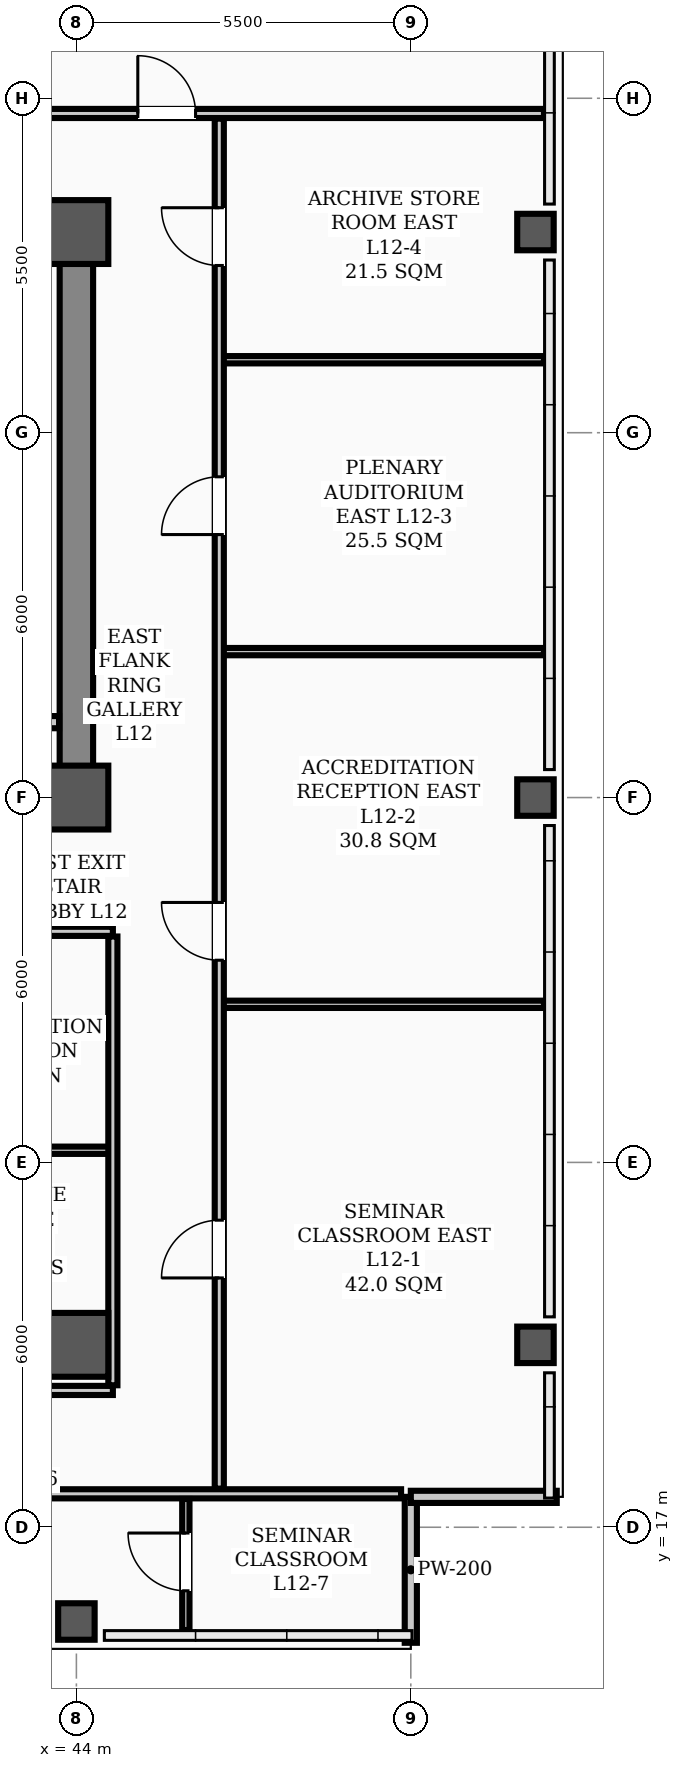
"""IFC4 building model, lengths in metres.
Left out: names, types, materials, properties, quantities, classifications, styles, units other than length and angle.
Written with IfcOpenShell. Run it as: python <this file> out.ifc"""

import sys

from ifc_helpers import new_model, si_unit, direction, frame, frame_2d, origin, origin_2d, place, context, subcontext, project, spatial, rectangle, hollow_rectangle, extrude, element, fill, save


model = new_model("IFC4")
c1 = context("Model", 3, precision=1e-05, world=origin(), true_north=direction((0.0, 1.0)))
c2 = subcontext(c1, "Body", "Model", "MODEL_VIEW")
j1 = project(units=[si_unit("LENGTHUNIT", "METRE"), si_unit("PLANEANGLEUNIT", "RADIAN")], contexts=[c1])
p1 = place(None, origin())
s1 = spatial("IfcSite", under=j1, at=p1, CompositionType="ELEMENT")
p2 = place(p1, origin())
s2 = spatial("IfcBuilding", under=s1, at=p2, CompositionType="ELEMENT")
p3 = place(p2, frame((0.0, 0.0, 49.9)))
s3 = spatial("IfcBuildingStorey", under=s2, at=p3, CompositionType="ELEMENT", Elevation=49.9)
for number, where, z_axis, x_axis in (
    (1, (44.0, 29.0, 0.0), (0.0, 0.0, 1.0), (1.0, 0.0, 0.0)),
    (2, (44.0, 38.3, 0.0), (0.0, 0.0, 1.0), (1.0, 0.0, 0.0)),
    (3, (44.0, 20.0, 0.0), (0.0, 0.0, 1.0), (1.0, 0.0, 0.0)),
):
    element("IfcColumn", number, at=place(p3, frame(where, z_axis=z_axis, x_axis=x_axis)), inside=s3, PredefinedType="COLUMN", context=c2, shape_type="SweptSolid", body=[
        extrude(hollow_rectangle(XDim=1.05, YDim=1.05, WallThickness=0.038, InnerFilletRadius=0.019, OuterFilletRadius=0.057, at=origin_2d()), origin(), (0.0, 0.0, 1.0), 3.9),
    ])
for number, where, z_axis, x_axis in (
    (4, (44.0, 15.45, 0.0), (0.0, 0.0, 1.0), (1.0, 0.0, 0.0)),
    (5, (51.55, 20.0, 0.0), (0.0, 0.0, 1.0), (1.0, 0.0, 0.0)),
    (6, (51.55, 29.0, 0.0), (0.0, 0.0, 1.0), (1.0, 0.0, 0.0)),
    (7, (51.55, 38.3, 0.0), (0.0, 0.0, 1.0), (1.0, 0.0, 0.0)),
):
    element("IfcColumn", number, at=place(p3, frame(where, z_axis=z_axis, x_axis=x_axis)), inside=s3, PredefinedType="COLUMN", context=c2, shape_type="SweptSolid", body=[
        extrude(hollow_rectangle(XDim=0.6, YDim=0.6, WallThickness=0.026, InnerFilletRadius=0.013, OuterFilletRadius=0.039, at=origin_2d()), origin(), (0.0, 0.0, 1.0), 3.9),
    ])
for number, where, z_axis, x_axis in (
    (8, (49.5, 15.1, 0.0), (0.0, 0.0, 1.0), (0.0, 1.0, 0.0)),
    (9, (49.5, 17.5, 0.0), (0.0, 0.0, 1.0), (1.0, 0.0, 0.0)),
):
    element("IfcWall", number, at=place(p3, frame(where, z_axis=z_axis, x_axis=x_axis)), inside=s3, PredefinedType="PARAPET", context=c2, shape_type="SweptSolid", body=[
        extrude(rectangle(XDim=2.4, YDim=0.2, at=frame_2d((1.2, 0.0))), origin(), (0.0, 0.0, 1.0), 1.2),
    ])
p4 = place(p3, frame((13.5, 29.0, 0.0), z_axis=(0.0, 0.0, 1.0), x_axis=(1.0, 0.0, 0.0)))
e10 = element("IfcWall", 10, at=p4, inside=s3, PredefinedType="SHEAR", context=c2, shape_type="SweptSolid", body=[
    extrude(rectangle(XDim=30.5, YDim=0.55, at=frame_2d((15.25, 0.0))), origin(), (0.0, 0.0, 1.0), 3.66),
])
p5 = place(p4, frame((1.75, 0.0, 0.0)))
e11 = element("IfcOpeningElement", 11, at=p5, cuts=e10, PredefinedType="OPENING", context=c2, shape_type="SweptSolid", body=[
    extrude(rectangle(XDim=1.1, YDim=2.08, at=frame_2d((0.55, 1.04))), frame((0.0, 0.285, 0.0), z_axis=(0.0, -1.0, 0.0), x_axis=(1.0, 0.0, 0.0)), (0.0, 0.0, 1.0), 0.57),
])
p6 = place(p4, frame((26.7, 0.0, 0.0)))
e12 = element("IfcOpeningElement", 12, at=p6, cuts=e10, PredefinedType="OPENING", context=c2, shape_type="SweptSolid", body=[
    extrude(rectangle(XDim=1.1, YDim=2.08, at=frame_2d((0.55, 1.04))), frame((0.0, 0.285, 0.0), z_axis=(0.0, -1.0, 0.0), x_axis=(1.0, 0.0, 0.0)), (0.0, 0.0, 1.0), 0.57),
])
p7 = place(p4, frame((6.8, 0.0, 0.0)))
e13 = element("IfcOpeningElement", 13, at=p7, cuts=e10, PredefinedType="OPENING", context=c2, shape_type="SweptSolid", body=[
    extrude(rectangle(XDim=1.1, YDim=2.08, at=frame_2d((0.55, 1.04))), frame((0.0, 0.285, 0.0), z_axis=(0.0, -1.0, 0.0), x_axis=(1.0, 0.0, 0.0)), (0.0, 0.0, 1.0), 0.57),
])
p8 = place(p4, frame((13.2, 0.0, 0.0)))
e14 = element("IfcOpeningElement", 14, at=p8, cuts=e10, PredefinedType="OPENING", context=c2, shape_type="SweptSolid", body=[
    extrude(rectangle(XDim=1.6, YDim=2.08, at=frame_2d((0.8, 1.04))), frame((0.0, 0.285, 0.0), z_axis=(0.0, -1.0, 0.0), x_axis=(1.0, 0.0, 0.0)), (0.0, 0.0, 1.0), 0.57),
])
p9 = place(p4, frame((19.53, 0.0, 0.0)))
e15 = element("IfcOpeningElement", 15, at=p9, cuts=e10, PredefinedType="OPENING", context=c2, shape_type="SweptSolid", body=[
    extrude(rectangle(XDim=0.9, YDim=2.08, at=frame_2d((0.45, 1.04))), frame((0.0, 0.285, 0.0), z_axis=(0.0, -1.0, 0.0), x_axis=(1.0, 0.0, 0.0)), (0.0, 0.0, 1.0), 0.57),
])
p10 = place(p4, frame((21.57, 0.0, 0.0)))
e16 = element("IfcOpeningElement", 16, at=p10, cuts=e10, PredefinedType="OPENING", context=c2, shape_type="SweptSolid", body=[
    extrude(rectangle(XDim=0.9, YDim=2.08, at=frame_2d((0.45, 1.04))), frame((0.0, 0.285, 0.0), z_axis=(0.0, -1.0, 0.0), x_axis=(1.0, 0.0, 0.0)), (0.0, 0.0, 1.0), 0.57),
])
p11 = place(p3, frame((13.5, 38.3, 0.0), z_axis=(0.0, 0.0, 1.0), x_axis=(1.0, 0.0, 0.0)))
e17 = element("IfcWall", 17, at=p11, inside=s3, PredefinedType="SHEAR", context=c2, shape_type="SweptSolid", body=[
    extrude(rectangle(XDim=30.5, YDim=0.55, at=frame_2d((15.25, 0.0))), origin(), (0.0, 0.0, 1.0), 3.66),
])
p12 = place(p3, frame((44.0, 29.35, 0.0), z_axis=(0.0, 0.0, 1.0), x_axis=(0.0, 1.0, 0.0)))
e18 = element("IfcWall", 18, at=p12, inside=s3, PredefinedType="SHEAR", context=c2, shape_type="SweptSolid", body=[
    extrude(rectangle(XDim=8.6, YDim=0.55, at=frame_2d((4.3, 0.0))), origin(), (0.0, 0.0, 1.0), 3.66),
])
p13 = place(p3, frame((42.4, 30.24, 0.0), z_axis=(0.0, 0.0, 1.0), x_axis=(1.0, 0.0, 0.0)))
e19 = element("IfcWall", 19, at=p13, inside=s3, PredefinedType="STANDARD", context=c2, shape_type="SweptSolid", body=[
    extrude(rectangle(XDim=1.315, YDim=0.2, at=frame_2d((0.658, 0.0))), origin(), (0.0, 0.0, 1.0), 2.24),
])
p14 = place(p3, frame((12.9, 26.8, 0.0), z_axis=(0.0, 0.0, 1.0), x_axis=(1.0, 0.0, 0.0)))
e20 = element("IfcWall", 20, at=p14, inside=s3, PredefinedType="PARTITIONING", context=c2, shape_type="SweptSolid", body=[
    extrude(rectangle(XDim=31.7, YDim=0.15, at=frame_2d((15.85, 0.0))), origin(), (0.0, 0.0, 1.0), 2.24),
])
p15 = place(p14, frame((13.6, 0.0, 0.0)))
e21 = element("IfcOpeningElement", 21, at=p15, cuts=e20, PredefinedType="OPENING", context=c2, shape_type="SweptSolid", body=[
    extrude(rectangle(XDim=1.6, YDim=2.08, at=frame_2d((0.8, 1.04))), frame((0.0, 0.085, 0.0), z_axis=(0.0, -1.0, 0.0), x_axis=(1.0, 0.0, 0.0)), (0.0, 0.0, 1.0), 0.17),
])
p16 = place(p14, frame((2.175, 0.0, 0.0)))
e22 = element("IfcOpeningElement", 22, at=p16, cuts=e20, PredefinedType="OPENING", context=c2, shape_type="SweptSolid", body=[
    extrude(rectangle(XDim=0.95, YDim=2.08, at=frame_2d((0.475, 1.04))), frame((0.0, 0.085, 0.0), z_axis=(0.0, -1.0, 0.0), x_axis=(1.0, 0.0, 0.0)), (0.0, 0.0, 1.0), 0.17),
])
p17 = place(p14, frame((6.925, 0.0, 0.0)))
e23 = element("IfcOpeningElement", 23, at=p17, cuts=e20, PredefinedType="OPENING", context=c2, shape_type="SweptSolid", body=[
    extrude(rectangle(XDim=0.95, YDim=2.08, at=frame_2d((0.475, 1.04))), frame((0.0, 0.085, 0.0), z_axis=(0.0, -1.0, 0.0), x_axis=(1.0, 0.0, 0.0)), (0.0, 0.0, 1.0), 0.17),
])
p18 = place(p14, frame((10.925, 0.0, 0.0)))
e24 = element("IfcOpeningElement", 24, at=p18, cuts=e20, PredefinedType="OPENING", context=c2, shape_type="SweptSolid", body=[
    extrude(rectangle(XDim=0.95, YDim=2.08, at=frame_2d((0.475, 1.04))), frame((0.0, 0.085, 0.0), z_axis=(0.0, -1.0, 0.0), x_axis=(1.0, 0.0, 0.0)), (0.0, 0.0, 1.0), 0.17),
])
p19 = place(p14, frame((16.025, 0.0, 0.0)))
e25 = element("IfcOpeningElement", 25, at=p19, cuts=e20, PredefinedType="OPENING", context=c2, shape_type="SweptSolid", body=[
    extrude(rectangle(XDim=0.95, YDim=2.08, at=frame_2d((0.475, 1.04))), frame((0.0, 0.085, 0.0), z_axis=(0.0, -1.0, 0.0), x_axis=(1.0, 0.0, 0.0)), (0.0, 0.0, 1.0), 0.17),
])
p20 = place(p14, frame((21.725, 0.0, 0.0)))
e26 = element("IfcOpeningElement", 26, at=p20, cuts=e20, PredefinedType="OPENING", context=c2, shape_type="SweptSolid", body=[
    extrude(rectangle(XDim=0.95, YDim=2.08, at=frame_2d((0.475, 1.04))), frame((0.0, 0.085, 0.0), z_axis=(0.0, -1.0, 0.0), x_axis=(1.0, 0.0, 0.0)), (0.0, 0.0, 1.0), 0.17),
])
p21 = place(p14, frame((27.925, 0.0, 0.0)))
e27 = element("IfcOpeningElement", 27, at=p21, cuts=e20, PredefinedType="OPENING", context=c2, shape_type="SweptSolid", body=[
    extrude(rectangle(XDim=0.95, YDim=2.08, at=frame_2d((0.475, 1.04))), frame((0.0, 0.085, 0.0), z_axis=(0.0, -1.0, 0.0), x_axis=(1.0, 0.0, 0.0)), (0.0, 0.0, 1.0), 0.17),
])
p22 = place(p3, frame((4.66, 17.55, 0.0), z_axis=(0.0, 0.0, 1.0), x_axis=(1.0, 0.0, 0.0)))
e28 = element("IfcWall", 28, at=p22, inside=s3, PredefinedType="PARTITIONING", context=c2, shape_type="SweptSolid", body=[
    extrude(rectangle(XDim=44.68, YDim=0.15, at=frame_2d((22.34, 0.0))), origin(), (0.0, 0.0, 1.0), 2.24),
])
p23 = place(p22, frame((10.565, 0.0, 0.0)))
e29 = element("IfcOpeningElement", 29, at=p23, cuts=e28, PredefinedType="OPENING", context=c2, shape_type="SweptSolid", body=[
    extrude(rectangle(XDim=0.95, YDim=2.08, at=frame_2d((0.475, 1.04))), frame((0.0, 0.085, 0.0), z_axis=(0.0, -1.0, 0.0), x_axis=(1.0, 0.0, 0.0)), (0.0, 0.0, 1.0), 0.17),
])
p24 = place(p22, frame((16.165, 0.0, 0.0)))
e30 = element("IfcOpeningElement", 30, at=p24, cuts=e28, PredefinedType="OPENING", context=c2, shape_type="SweptSolid", body=[
    extrude(rectangle(XDim=0.95, YDim=2.08, at=frame_2d((0.475, 1.04))), frame((0.0, 0.085, 0.0), z_axis=(0.0, -1.0, 0.0), x_axis=(1.0, 0.0, 0.0)), (0.0, 0.0, 1.0), 0.17),
])
p25 = place(p22, frame((30.565, 0.0, 0.0)))
e31 = element("IfcOpeningElement", 31, at=p25, cuts=e28, PredefinedType="OPENING", context=c2, shape_type="SweptSolid", body=[
    extrude(rectangle(XDim=0.95, YDim=2.08, at=frame_2d((0.475, 1.04))), frame((0.0, 0.085, 0.0), z_axis=(0.0, -1.0, 0.0), x_axis=(1.0, 0.0, 0.0)), (0.0, 0.0, 1.0), 0.17),
])
p26 = place(p22, frame((37.365, 0.0, 0.0)))
e32 = element("IfcOpeningElement", 32, at=p26, cuts=e28, PredefinedType="OPENING", context=c2, shape_type="SweptSolid", body=[
    extrude(rectangle(XDim=0.95, YDim=2.08, at=frame_2d((0.475, 1.04))), frame((0.0, 0.085, 0.0), z_axis=(0.0, -1.0, 0.0), x_axis=(1.0, 0.0, 0.0)), (0.0, 0.0, 1.0), 0.17),
])
p27 = place(p3, frame((28.4, 19.25, 0.0), z_axis=(0.0, 0.0, 1.0), x_axis=(1.0, 0.0, 0.0)))
e33 = element("IfcWall", 33, at=p27, inside=s3, PredefinedType="PARTITIONING", context=c2, shape_type="SweptSolid", body=[
    extrude(rectangle(XDim=16.2, YDim=0.15, at=frame_2d((8.1, 0.0))), origin(), (0.0, 0.0, 1.0), 2.24),
])
p28 = place(p27, frame((0.525, 0.0, 0.0)))
e34 = element("IfcOpeningElement", 34, at=p28, cuts=e33, PredefinedType="OPENING", context=c2, shape_type="SweptSolid", body=[
    extrude(rectangle(XDim=0.95, YDim=2.08, at=frame_2d((0.475, 1.04))), frame((0.0, 0.085, 0.0), z_axis=(0.0, -1.0, 0.0), x_axis=(1.0, 0.0, 0.0)), (0.0, 0.0, 1.0), 0.17),
])
p29 = place(p27, frame((6.225, 0.0, 0.0)))
e35 = element("IfcOpeningElement", 35, at=p29, cuts=e33, PredefinedType="OPENING", context=c2, shape_type="SweptSolid", body=[
    extrude(rectangle(XDim=0.95, YDim=2.08, at=frame_2d((0.475, 1.04))), frame((0.0, 0.085, 0.0), z_axis=(0.0, -1.0, 0.0), x_axis=(1.0, 0.0, 0.0)), (0.0, 0.0, 1.0), 0.17),
])
p30 = place(p27, frame((12.425, 0.0, 0.0)))
e36 = element("IfcOpeningElement", 36, at=p30, cuts=e33, PredefinedType="OPENING", context=c2, shape_type="SweptSolid", body=[
    extrude(rectangle(XDim=0.95, YDim=2.08, at=frame_2d((0.475, 1.04))), frame((0.0, 0.085, 0.0), z_axis=(0.0, -1.0, 0.0), x_axis=(1.0, 0.0, 0.0)), (0.0, 0.0, 1.0), 0.17),
])
p31 = place(p3, frame((38.0, 23.2, 0.0), z_axis=(0.0, 0.0, 1.0), x_axis=(1.0, 0.0, 0.0)))
e37 = element("IfcWall", 37, at=p31, inside=s3, PredefinedType="PARTITIONING", context=c2, shape_type="SweptSolid", body=[
    extrude(rectangle(XDim=6.6, YDim=0.12, at=frame_2d((3.3, 0.0))), origin(), (0.0, 0.0, 1.0), 2.24),
])
p32 = place(p3, frame((46.35, 25.6, 0.0), z_axis=(0.0, 0.0, 1.0), x_axis=(1.0, 0.0, 0.0)))
e38 = element("IfcWall", 38, at=p32, inside=s3, PredefinedType="PARTITIONING", context=c2, shape_type="SweptSolid", body=[
    extrude(rectangle(XDim=5.34, YDim=0.12, at=frame_2d((2.67, 0.0))), origin(), (0.0, 0.0, 1.0), 3.66),
])
for number, where, z_axis, x_axis in (
    (39, (46.35, 31.4, 0.0), (0.0, 0.0, 1.0), (1.0, 0.0, 0.0)),
    (40, (46.35, 36.2, 0.0), (0.0, 0.0, 1.0), (1.0, 0.0, 0.0)),
):
    element("IfcWall", number, at=place(p3, frame(where, z_axis=z_axis, x_axis=x_axis)), inside=s3, PredefinedType="PARTITIONING", context=c2, shape_type="SweptSolid", body=[
        extrude(rectangle(XDim=5.34, YDim=0.12, at=frame_2d((2.67, 0.0))), origin(), (0.0, 0.0, 1.0), 3.32),
    ])
p33 = place(p3, frame((2.31, 40.25, 0.0), z_axis=(0.0, 0.0, 1.0), x_axis=(1.0, 0.0, 0.0)))
e41 = element("IfcWall", 41, at=p33, inside=s3, PredefinedType="PARTITIONING", context=c2, shape_type="SweptSolid", body=[
    extrude(rectangle(XDim=49.38, YDim=0.15, at=frame_2d((24.69, 0.0))), origin(), (0.0, 0.0, 1.0), 2.24),
])
p34 = place(p33, frame((9.23, 0.0, 0.0)))
e42 = element("IfcOpeningElement", 42, at=p34, cuts=e41, PredefinedType="OPENING", context=c2, shape_type="SweptSolid", body=[
    extrude(rectangle(XDim=0.95, YDim=2.08, at=frame_2d((0.475, 1.04))), frame((0.0, 0.085, 0.0), z_axis=(0.0, -1.0, 0.0), x_axis=(1.0, 0.0, 0.0)), (0.0, 0.0, 1.0), 0.17),
])
p35 = place(p33, frame((17.215, 0.0, 0.0)))
e43 = element("IfcOpeningElement", 43, at=p35, cuts=e41, PredefinedType="OPENING", context=c2, shape_type="SweptSolid", body=[
    extrude(rectangle(XDim=0.95, YDim=2.08, at=frame_2d((0.475, 1.04))), frame((0.0, 0.085, 0.0), z_axis=(0.0, -1.0, 0.0), x_axis=(1.0, 0.0, 0.0)), (0.0, 0.0, 1.0), 0.17),
])
p36 = place(p33, frame((24.915, 0.0, 0.0)))
e44 = element("IfcOpeningElement", 44, at=p36, cuts=e41, PredefinedType="OPENING", context=c2, shape_type="SweptSolid", body=[
    extrude(rectangle(XDim=0.95, YDim=2.08, at=frame_2d((0.475, 1.04))), frame((0.0, 0.085, 0.0), z_axis=(0.0, -1.0, 0.0), x_axis=(1.0, 0.0, 0.0)), (0.0, 0.0, 1.0), 0.17),
])
p37 = place(p33, frame((32.815, 0.0, 0.0)))
e45 = element("IfcOpeningElement", 45, at=p37, cuts=e41, PredefinedType="OPENING", context=c2, shape_type="SweptSolid", body=[
    extrude(rectangle(XDim=0.95, YDim=2.08, at=frame_2d((0.475, 1.04))), frame((0.0, 0.085, 0.0), z_axis=(0.0, -1.0, 0.0), x_axis=(1.0, 0.0, 0.0)), (0.0, 0.0, 1.0), 0.17),
])
p38 = place(p33, frame((42.7, 0.0, 0.0)))
e46 = element("IfcOpeningElement", 46, at=p38, cuts=e41, PredefinedType="OPENING", context=c2, shape_type="SweptSolid", body=[
    extrude(rectangle(XDim=0.95, YDim=2.08, at=frame_2d((0.475, 1.04))), frame((0.0, 0.085, 0.0), z_axis=(0.0, -1.0, 0.0), x_axis=(1.0, 0.0, 0.0)), (0.0, 0.0, 1.0), 0.17),
])
p39 = place(p3, frame((46.35, 17.635, 0.0), z_axis=(0.0, 0.0, 1.0), x_axis=(0.0, 1.0, 0.0)))
e47 = element("IfcWall", 47, at=p39, inside=s3, PredefinedType="PARTITIONING", context=c2, shape_type="SweptSolid", body=[
    extrude(rectangle(XDim=22.53, YDim=0.15, at=frame_2d((11.265, 0.0))), origin(), (0.0, 0.0, 1.0), 2.24),
])
p40 = place(p39, frame((3.465, 0.0, 0.0)))
e48 = element("IfcOpeningElement", 48, at=p40, cuts=e47, PredefinedType="OPENING", context=c2, shape_type="SweptSolid", body=[
    extrude(rectangle(XDim=0.95, YDim=2.08, at=frame_2d((0.475, 1.04))), frame((0.0, 0.085, 0.0), z_axis=(0.0, -1.0, 0.0), x_axis=(1.0, 0.0, 0.0)), (0.0, 0.0, 1.0), 0.17),
])
p41 = place(p39, frame((8.69, 0.0, 0.0)))
e49 = element("IfcOpeningElement", 49, at=p41, cuts=e47, PredefinedType="OPENING", context=c2, shape_type="SweptSolid", body=[
    extrude(rectangle(XDim=0.95, YDim=2.08, at=frame_2d((0.475, 1.04))), frame((0.0, 0.085, 0.0), z_axis=(0.0, -1.0, 0.0), x_axis=(1.0, 0.0, 0.0)), (0.0, 0.0, 1.0), 0.17),
])
p42 = place(p39, frame((15.69, 0.0, 0.0)))
e50 = element("IfcOpeningElement", 50, at=p42, cuts=e47, PredefinedType="OPENING", context=c2, shape_type="SweptSolid", body=[
    extrude(rectangle(XDim=0.95, YDim=2.08, at=frame_2d((0.475, 1.04))), frame((0.0, 0.085, 0.0), z_axis=(0.0, -1.0, 0.0), x_axis=(1.0, 0.0, 0.0)), (0.0, 0.0, 1.0), 0.17),
])
p43 = place(p39, frame((20.115, 0.0, 0.0)))
e51 = element("IfcOpeningElement", 51, at=p43, cuts=e47, PredefinedType="OPENING", context=c2, shape_type="SweptSolid", body=[
    extrude(rectangle(XDim=0.95, YDim=2.08, at=frame_2d((0.475, 1.04))), frame((0.0, 0.085, 0.0), z_axis=(0.0, -1.0, 0.0), x_axis=(1.0, 0.0, 0.0)), (0.0, 0.0, 1.0), 0.17),
])
p44 = place(p3, frame((44.6, 19.335, 0.0), z_axis=(0.0, 0.0, 1.0), x_axis=(0.0, 1.0, 0.0)))
e52 = element("IfcWall", 52, at=p44, inside=s3, PredefinedType="PARTITIONING", context=c2, shape_type="SweptSolid", body=[
    extrude(rectangle(XDim=7.38, YDim=0.15, at=frame_2d((3.69, 0.0))), origin(), (0.0, 0.0, 1.0), 2.24),
])
p45 = place(p3, frame((45.8, 15.31, 0.0), z_axis=(0.0, 0.0, 1.0), x_axis=(0.0, 1.0, 0.0)))
e53 = element("IfcWall", 53, at=p45, inside=s3, PredefinedType="PARTITIONING", context=c2, shape_type="SweptSolid", body=[
    extrude(rectangle(XDim=2.155, YDim=0.12, at=frame_2d((1.078, 0.0))), origin(), (0.0, 0.0, 1.0), 3.66),
])
p46 = place(p45, frame((0.645, 0.0, 0.0)))
e54 = element("IfcOpeningElement", 54, at=p46, cuts=e53, PredefinedType="OPENING", context=c2, shape_type="SweptSolid", body=[
    extrude(rectangle(XDim=0.95, YDim=2.08, at=frame_2d((0.475, 1.04))), frame((0.0, 0.07, 0.0), z_axis=(0.0, -1.0, 0.0), x_axis=(1.0, 0.0, 0.0)), (0.0, 0.0, 1.0), 0.14),
])
p47 = place(p46, origin())
e55 = element("IfcDoor", 55, at=p47, inside=s3, OperationType="SINGLE_SWING_RIGHT", PredefinedType="DOOR", context=c2, shape_type="SweptSolid", body=[
    extrude(rectangle(XDim=0.95, YDim=2.08, at=frame_2d((0.475, 1.04))), frame((0.0, 0.025, 0.0), z_axis=(0.0, -1.0, 0.0), x_axis=(1.0, 0.0, 0.0)), (0.0, 0.0, 1.0), 0.05),
])
fill(e54, e55)
p48 = place(p40, origin())
e56 = element("IfcDoor", 56, at=p48, inside=s3, OperationType="SINGLE_SWING_LEFT", PredefinedType="DOOR", context=c2, shape_type="SweptSolid", body=[
    extrude(rectangle(XDim=0.95, YDim=2.08, at=frame_2d((0.475, 1.04))), frame((0.0, 0.025, 0.0), z_axis=(0.0, -1.0, 0.0), x_axis=(1.0, 0.0, 0.0)), (0.0, 0.0, 1.0), 0.05),
])
fill(e48, e56)
p49 = place(p41, origin())
e57 = element("IfcDoor", 57, at=p49, inside=s3, OperationType="SINGLE_SWING_RIGHT", PredefinedType="DOOR", context=c2, shape_type="SweptSolid", body=[
    extrude(rectangle(XDim=0.95, YDim=2.08, at=frame_2d((0.475, 1.04))), frame((0.0, 0.025, 0.0), z_axis=(0.0, -1.0, 0.0), x_axis=(1.0, 0.0, 0.0)), (0.0, 0.0, 1.0), 0.05),
])
fill(e49, e57)
p50 = place(p42, origin())
e58 = element("IfcDoor", 58, at=p50, inside=s3, OperationType="SINGLE_SWING_LEFT", PredefinedType="DOOR", context=c2, shape_type="SweptSolid", body=[
    extrude(rectangle(XDim=0.95, YDim=2.08, at=frame_2d((0.475, 1.04))), frame((0.0, 0.025, 0.0), z_axis=(0.0, -1.0, 0.0), x_axis=(1.0, 0.0, 0.0)), (0.0, 0.0, 1.0), 0.05),
])
fill(e50, e58)
p51 = place(p43, origin())
e59 = element("IfcDoor", 59, at=p51, inside=s3, OperationType="SINGLE_SWING_RIGHT", PredefinedType="DOOR", context=c2, shape_type="SweptSolid", body=[
    extrude(rectangle(XDim=0.95, YDim=2.08, at=frame_2d((0.475, 1.04))), frame((0.0, 0.025, 0.0), z_axis=(0.0, -1.0, 0.0), x_axis=(1.0, 0.0, 0.0)), (0.0, 0.0, 1.0), 0.05),
])
fill(e51, e59)
p52 = place(p38, origin())
e60 = element("IfcDoor", 60, at=p52, inside=s3, OperationType="SINGLE_SWING_LEFT", PredefinedType="DOOR", context=c2, shape_type="SweptSolid", body=[
    extrude(rectangle(XDim=0.95, YDim=2.08, at=frame_2d((0.475, 1.04))), frame((0.0, 0.025, 0.0), z_axis=(0.0, -1.0, 0.0), x_axis=(1.0, 0.0, 0.0)), (0.0, 0.0, 1.0), 0.05),
])
fill(e46, e60)
save(model, sys.argv[1])
